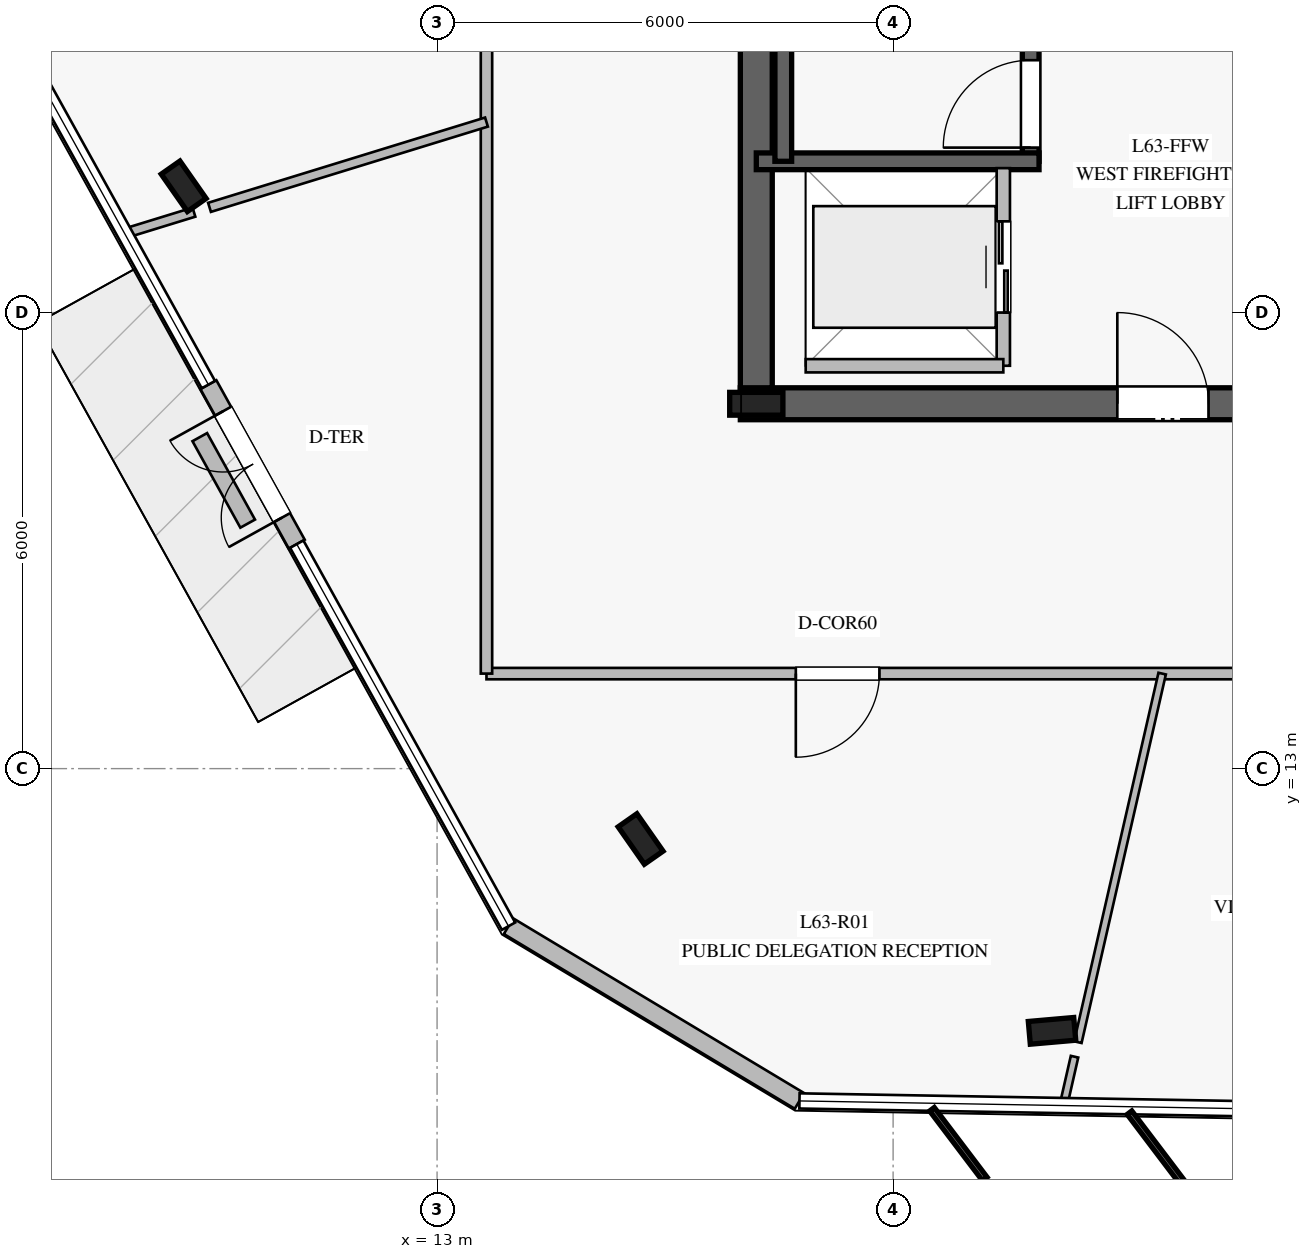
"""IFC4 building model, lengths in metres.
Left out: names, types, materials, properties, quantities, classifications, styles, units other than length and angle.
Written with IfcOpenShell. Run it as: python <this file> out.ifc"""

import sys

from ifc_helpers import new_model, si_unit, direction, frame, frame_2d, origin, origin_2d, place, context, subcontext, project, spatial, rectangle, i_section, extrude, element, fill, save


model = new_model("IFC4")
c1 = context("Model", 3, precision=1e-05, world=origin(), true_north=direction((0.0, 1.0)))
c2 = subcontext(c1, "Body", "Model", "MODEL_VIEW")
j1 = project(units=[si_unit("LENGTHUNIT", "METRE"), si_unit("PLANEANGLEUNIT", "RADIAN")], contexts=[c1])
p1 = place(None, origin())
s1 = spatial("IfcSite", under=j1, at=p1, CompositionType="ELEMENT")
p2 = place(p1, origin())
s2 = spatial("IfcBuilding", under=s1, at=p2, CompositionType="ELEMENT")
p3 = place(p2, frame((0.0, 0.0, 262.2)))
s3 = spatial("IfcBuildingStorey", under=s2, at=p3, CompositionType="ELEMENT", Elevation=262.2)
p4 = place(p3, frame((16.99, 17.8, 0.0), z_axis=(0.0, 0.0, 1.0), x_axis=(1.0, 0.0, 0.0)))
e1 = element("IfcWall", 1, at=p4, inside=s3, PredefinedType="SHEAR", context=c2, shape_type="SweptSolid", body=[
    extrude(rectangle(XDim=16.02, YDim=0.42, at=frame_2d((8.01, 0.0))), origin(), (0.0, 0.0, 1.0), 3.78),
])
p5 = place(p4, frame((4.96, 0.0, 0.0)))
e2 = element("IfcOpeningElement", 2, at=p5, cuts=e1, PredefinedType="OPENING", context=c2, shape_type="SweptSolid", body=[
    extrude(rectangle(XDim=1.2, YDim=2.25, at=frame_2d((0.6, 1.125))), frame((0.0, 0.22, 0.0), z_axis=(0.0, -1.0, 0.0), x_axis=(1.0, 0.0, 0.0)), (0.0, 0.0, 1.0), 0.44),
])
p6 = place(p4, frame((13.91, 0.0, 0.0)))
e3 = element("IfcOpeningElement", 3, at=p6, cuts=e1, PredefinedType="OPENING", context=c2, shape_type="SweptSolid", body=[
    extrude(rectangle(XDim=0.9, YDim=2.1, at=frame_2d((0.45, 1.05))), frame((0.0, 0.22, 0.0), z_axis=(0.0, -1.0, 0.0), x_axis=(1.0, 0.0, 0.0)), (0.0, 0.0, 1.0), 0.44),
])
p7 = place(p4, frame((9.16, 0.0, 0.0)))
e4 = element("IfcOpeningElement", 4, at=p7, cuts=e1, PredefinedType="OPENING", context=c2, shape_type="SweptSolid", body=[
    extrude(rectangle(XDim=1.1, YDim=2.2, at=frame_2d((0.55, 1.1))), frame((0.0, 0.22, 0.0), z_axis=(0.0, -1.0, 0.0), x_axis=(1.0, 0.0, 0.0)), (0.0, 0.0, 1.0), 0.44),
])
p8 = place(p3, frame((17.2, 31.99, 0.0), z_axis=(0.0, 0.0, 1.0), x_axis=(0.0, -1.0, 0.0)))
e5 = element("IfcWall", 5, at=p8, inside=s3, PredefinedType="SHEAR", context=c2, shape_type="SweptSolid", body=[
    extrude(rectangle(XDim=13.98, YDim=0.42, at=frame_2d((6.99, 0.0))), origin(), (0.0, 0.0, 1.0), 3.78),
])
p9 = place(p8, frame((2.14, 0.0, 0.0)))
e6 = element("IfcOpeningElement", 6, at=p9, cuts=e5, PredefinedType="OPENING", context=c2, shape_type="SweptSolid", body=[
    extrude(rectangle(XDim=1.5, YDim=2.2, at=frame_2d((0.75, 1.1))), frame((0.0, 0.22, 0.0), z_axis=(0.0, -1.0, 0.0), x_axis=(1.0, 0.0, 0.0)), (0.0, 0.0, 1.0), 0.44),
])
p10 = place(p3, frame((17.2, 17.8, 0.0), z_axis=(0.0, 0.0, 1.0), x_axis=(1.0, 0.0, 0.0)))
e7 = element("IfcColumn", 7, at=p10, inside=s3, PredefinedType="COLUMN", context=c2, shape_type="SweptSolid", body=[
    extrude(i_section(OverallWidth=0.3, OverallDepth=0.7, WebThickness=0.017, FlangeThickness=0.032, at=origin_2d()), origin(), (0.0, 0.0, 1.0), 4.0),
])
p11 = place(p3, frame((20.81, 20.99, 0.0), z_axis=(0.0, 0.0, 1.0), x_axis=(0.0, 1.0, 0.0)))
e8 = element("IfcWall", 8, at=p11, inside=s3, PredefinedType="SOLIDWALL", context=c2, shape_type="SweptSolid", body=[
    extrude(rectangle(XDim=7.22, YDim=0.22, at=frame_2d((3.61, 0.0))), origin(), (0.0, 0.0, 1.0), 3.78),
])
p12 = place(p11, frame((0.18, 0.0, 0.0)))
e9 = element("IfcOpeningElement", 9, at=p12, cuts=e8, PredefinedType="OPENING", context=c2, shape_type="SweptSolid", body=[
    extrude(rectangle(XDim=1.15, YDim=2.2, at=frame_2d((0.575, 1.1))), frame((0.0, 0.12, 0.0), z_axis=(0.0, -1.0, 0.0), x_axis=(1.0, 0.0, 0.0)), (0.0, 0.0, 1.0), 0.24),
])
p13 = place(p3, frame((17.2, 20.99, 0.0), z_axis=(0.0, 0.0, 1.0), x_axis=(1.0, 0.0, 0.0)))
e10 = element("IfcWall", 10, at=p13, inside=s3, PredefinedType="SOLIDWALL", context=c2, shape_type="SweptSolid", body=[
    extrude(rectangle(XDim=3.72, YDim=0.22, at=frame_2d((1.86, 0.0))), origin(), (0.0, 0.0, 1.0), 3.78),
])
p14 = place(p3, frame((17.555, 28.21, 0.0), z_axis=(0.0, 0.0, 1.0), x_axis=(0.0, -1.0, 0.0)))
e11 = element("IfcWall", 11, at=p14, inside=s3, PredefinedType="SOLIDWALL", context=c2, shape_type="SweptSolid", body=[
    extrude(rectangle(XDim=7.22, YDim=0.22, at=frame_2d((3.61, 0.0))), origin(), (0.0, 0.0, 1.0), 3.78),
])
for number, where, z_axis, x_axis in (
    (12, (9.666, 20.661, 0.0), (0.0, 0.0, 1.0), (-0.574, 0.819, 0.0)),
    (13, (15.678, 12.074, 0.0), (0.0, 0.0, 1.0), (-0.574, 0.819, 0.0)),
    (14, (21.091, 9.55, 0.0), (0.0, 0.0, 1.0), (0.996, 0.087, 0.0)),
):
    element("IfcColumn", number, at=place(p3, frame(where, z_axis=z_axis, x_axis=x_axis)), inside=s3, PredefinedType="COLUMN", context=c2, shape_type="SweptSolid", body=[
        extrude(i_section(OverallWidth=0.3, OverallDepth=0.6, WebThickness=0.015, FlangeThickness=0.03, at=origin_2d()), origin(), (0.0, 0.0, 1.0), 4.0),
    ])
p15 = place(p3, frame((9.991, 18.052, 0.0), z_axis=(0.0, 0.0, 1.0), x_axis=(0.484657920522, -0.874703778473, 0.0)))
e15 = element("IfcWall", 15, at=p15, inside=s3, PredefinedType="STANDARD", context=c2, shape_type="SweptSolid", body=[
    extrude(rectangle(XDim=2.4, YDim=0.24, at=frame_2d((1.2, 0.0))), origin(), (0.0, 0.0, 1.0), 3.78),
])
p16 = place(p15, frame((0.4, 0.0, 0.0)))
e16 = element("IfcOpeningElement", 16, at=p16, cuts=e15, PredefinedType="OPENING", context=c2, shape_type="SweptSolid", body=[
    extrude(rectangle(XDim=1.6, YDim=2.25, at=frame_2d((0.8, 1.125))), frame((0.0, 0.13, 0.0), z_axis=(0.0, -1.0, 0.0), x_axis=(1.0, 0.0, 0.0)), (0.0, 0.0, 1.0), 0.26),
])
p17 = place(p3, frame((13.94, 10.927, 0.0), z_axis=(0.0, 0.0, 1.0), x_axis=(0.857275764621, -0.514857517566, 0.0)))
e17 = element("IfcWall", 17, at=p17, inside=s3, PredefinedType="STANDARD", context=c2, shape_type="SweptSolid", body=[
    extrude(rectangle(XDim=4.465, YDim=0.24, at=frame_2d((2.233, 0.0))), origin(), (0.0, 0.0, 1.0), 3.78),
])
p18 = place(p3, frame((9.878, 17.361, 0.0), z_axis=(0.0, 0.0, 1.0), x_axis=(0.484351793237, -0.874873328195, 0.0)))
e18 = element("IfcWall", 18, at=p18, inside=s3, PredefinedType="USERDEFINED", context=c2, shape_type="SweptSolid", body=[
    extrude(rectangle(XDim=1.301, YDim=0.22, at=frame_2d((0.65, 0.0))), origin(), (0.0, 0.0, 1.0), 0.4),
])
p19 = place(p3, frame((20.45, 18.3, 0.0), z_axis=(0.0, 0.0, 1.0), x_axis=(0.0, 1.0, 0.0)))
e19 = element("IfcWall", 19, at=p19, inside=s3, PredefinedType="PARTITIONING", context=c2, shape_type="SweptSolid", body=[
    extrude(rectangle(XDim=2.6, YDim=0.175, at=frame_2d((1.3, 0.0))), origin(), (0.0, 0.0, 1.0), 3.78),
])
p20 = place(p19, frame((0.7, 0.0, 0.0)))
e20 = element("IfcOpeningElement", 20, at=p20, cuts=e19, PredefinedType="OPENING", context=c2, shape_type="SweptSolid", body=[
    extrude(rectangle(XDim=1.2, YDim=2.2, at=frame_2d((0.6, 1.1))), frame((0.0, 0.098, 0.0), z_axis=(0.0, -1.0, 0.0), x_axis=(1.0, 0.0, 0.0)), (0.0, 0.0, 1.0), 0.195),
])
p21 = place(p3, frame((17.85, 18.3, 0.0), z_axis=(0.0, 0.0, 1.0), x_axis=(1.0, 0.0, 0.0)))
e21 = element("IfcWall", 21, at=p21, inside=s3, PredefinedType="PARTITIONING", context=c2, shape_type="SweptSolid", body=[
    extrude(rectangle(XDim=2.6, YDim=0.175, at=frame_2d((1.3, 0.0))), origin(), (0.0, 0.0, 1.0), 3.78),
])
p22 = place(p3, frame((36.35, 14.25, 0.0), z_axis=(0.0, 0.0, 1.0), x_axis=(-1.0, 0.0, 0.0)))
e22 = element("IfcWall", 22, at=p22, inside=s3, PredefinedType="PARTITIONING", context=c2, shape_type="SweptSolid", body=[
    extrude(rectangle(XDim=22.7, YDim=0.15, at=frame_2d((11.35, 0.0))), origin(), (0.0, 0.0, 1.0), 3.28),
])
p23 = place(p22, frame((17.53, 0.0, 0.0)))
e23 = element("IfcOpeningElement", 23, at=p23, cuts=e22, PredefinedType="OPENING", context=c2, shape_type="SweptSolid", body=[
    extrude(rectangle(XDim=1.1, YDim=2.2, at=frame_2d((0.55, 1.1))), frame((0.0, 0.085, 0.0), z_axis=(0.0, -1.0, 0.0), x_axis=(1.0, 0.0, 0.0)), (0.0, 0.0, 1.0), 0.17),
])
p24 = place(p22, frame((8.078, 0.0, 0.0)))
e24 = element("IfcOpeningElement", 24, at=p24, cuts=e22, PredefinedType="OPENING", context=c2, shape_type="SweptSolid", body=[
    extrude(rectangle(XDim=1.1, YDim=2.2, at=frame_2d((0.55, 1.1))), frame((0.0, 0.085, 0.0), z_axis=(0.0, -1.0, 0.0), x_axis=(1.0, 0.0, 0.0)), (0.0, 0.0, 1.0), 0.17),
])
p25 = place(p3, frame((13.65, 14.25, 0.0), z_axis=(0.0, 0.0, 1.0), x_axis=(0.0, 1.0, 0.0)))
e25 = element("IfcWall", 25, at=p25, inside=s3, PredefinedType="PARTITIONING", context=c2, shape_type="SweptSolid", body=[
    extrude(rectangle(XDim=21.5, YDim=0.15, at=frame_2d((10.75, 0.0))), origin(), (0.0, 0.0, 1.0), 3.25),
])
p26 = place(p25, frame((11.876, 0.0, 0.0)))
e26 = element("IfcOpeningElement", 26, at=p26, cuts=e25, PredefinedType="OPENING", context=c2, shape_type="SweptSolid", body=[
    extrude(rectangle(XDim=1.1, YDim=2.2, at=frame_2d((0.55, 1.1))), frame((0.0, 0.085, 0.0), z_axis=(0.0, -1.0, 0.0), x_axis=(1.0, 0.0, 0.0)), (0.0, 0.0, 1.0), 0.17),
])
p27 = place(p3, frame((13.65, 21.506, 0.0), z_axis=(0.0, 0.0, 1.0), x_axis=(-0.955712527057, -0.294301827427, 0.0)))
e27 = element("IfcWall", 27, at=p27, inside=s3, PredefinedType="PARTITIONING", context=c2, shape_type="SweptSolid", body=[
    extrude(rectangle(XDim=3.813, YDim=0.125, at=frame_2d((1.906, 0.0))), origin(), (0.0, 0.0, 1.0), 3.28),
])
p28 = place(p3, frame((9.801, 20.321, 0.0), z_axis=(0.0, 0.0, 1.0), x_axis=(-0.955739628223, -0.294213804986, 0.0)))
e28 = element("IfcWall", 28, at=p28, inside=s3, PredefinedType="PARTITIONING", context=c2, shape_type="SweptSolid", body=[
    extrude(rectangle(XDim=0.938, YDim=0.125, at=frame_2d((0.469, 0.0))), origin(), (0.0, 0.0, 1.0), 3.28),
])
p29 = place(p3, frame((22.54, 14.25, 0.0), z_axis=(0.0, 0.0, 1.0), x_axis=(-0.222970058827, -0.97482529351, 0.0)))
e29 = element("IfcWall", 29, at=p29, inside=s3, PredefinedType="MOVABLE", context=c2, shape_type="SweptSolid", body=[
    extrude(rectangle(XDim=4.974, YDim=0.1, at=frame_2d((2.487, 0.0))), origin(), (0.0, 0.0, 1.0), 3.28),
])
p30 = place(p3, frame((21.387, 9.21, 0.0), z_axis=(0.0, 0.0, 1.0), x_axis=(-0.222474296585, -0.974938555684, 0.0)))
e30 = element("IfcWall", 30, at=p30, inside=s3, PredefinedType="MOVABLE", context=c2, shape_type="SweptSolid", body=[
    extrude(rectangle(XDim=0.643, YDim=0.1, at=frame_2d((0.322, 0.0))), origin(), (0.0, 0.0, 1.0), 3.78),
])
p31 = place(p16, frame((1.6, 0.0, 0.0), z_axis=(0.0, 0.0, 1.0), x_axis=(-1.0, 0.0, 0.0)))
e31 = element("IfcDoor", 31, at=p31, inside=s3, OperationType="DOUBLE_DOOR_SINGLE_SWING", PredefinedType="DOOR", context=c2, shape_type="SweptSolid", body=[
    extrude(rectangle(XDim=1.6, YDim=2.25, at=frame_2d((0.8, 1.125))), frame((0.0, 0.025, 0.0), z_axis=(0.0, -1.0, 0.0), x_axis=(1.0, 0.0, 0.0)), (0.0, 0.0, 1.0), 0.05),
])
fill(e16, e31)
p32 = place(p12, origin())
e32 = element("IfcDoor", 32, at=p32, inside=s3, OperationType="SINGLE_SWING_LEFT", PredefinedType="DOOR", context=c2, shape_type="SweptSolid", body=[
    extrude(rectangle(XDim=1.15, YDim=2.2, at=frame_2d((0.575, 1.1))), frame((0.0, 0.025, 0.0), z_axis=(0.0, -1.0, 0.0), x_axis=(1.0, 0.0, 0.0)), (0.0, 0.0, 1.0), 0.05),
])
fill(e9, e32)
p33 = place(p5, origin())
e33 = element("IfcDoor", 33, at=p33, inside=s3, OperationType="SINGLE_SWING_LEFT", PredefinedType="DOOR", context=c2, shape_type="SweptSolid", body=[
    extrude(rectangle(XDim=1.2, YDim=2.25, at=frame_2d((0.6, 1.125))), frame((0.0, 0.025, 0.0), z_axis=(0.0, -1.0, 0.0), x_axis=(1.0, 0.0, 0.0)), (0.0, 0.0, 1.0), 0.05),
])
fill(e2, e33)
p34 = place(p20, origin())
e34 = element("IfcDoor", 34, at=p34, inside=s3, OperationType="DOUBLE_DOOR_SLIDING", PredefinedType="DOOR", context=c2, shape_type="SweptSolid", body=[
    extrude(rectangle(XDim=1.2, YDim=2.2, at=frame_2d((0.6, 1.1))), frame((0.0, 0.025, 0.0), z_axis=(0.0, -1.0, 0.0), x_axis=(1.0, 0.0, 0.0)), (0.0, 0.0, 1.0), 0.05),
])
fill(e20, e34)
p35 = place(p23, origin())
e35 = element("IfcDoor", 35, at=p35, inside=s3, OperationType="SINGLE_SWING_RIGHT", PredefinedType="DOOR", context=c2, shape_type="SweptSolid", body=[
    extrude(rectangle(XDim=1.1, YDim=2.2, at=frame_2d((0.55, 1.1))), frame((0.0, 0.025, 0.0), z_axis=(0.0, -1.0, 0.0), x_axis=(1.0, 0.0, 0.0)), (0.0, 0.0, 1.0), 0.05),
])
fill(e23, e35)
save(model, sys.argv[1])
